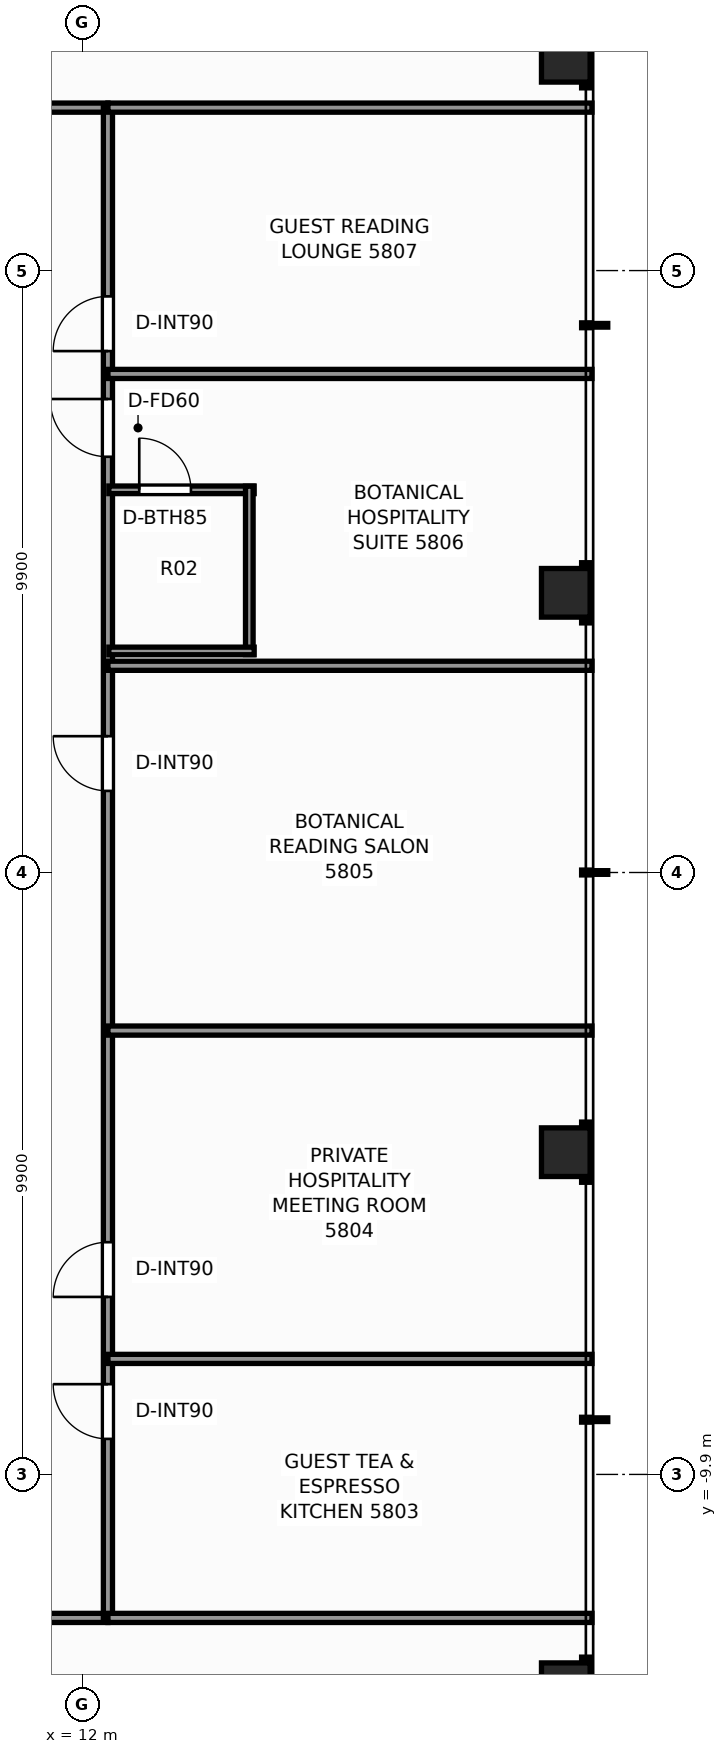
"""IFC4 building model, lengths in metres.
Left out: names, types, materials, properties, quantities, classifications, styles, units other than length and angle.
Written with IfcOpenShell. Run it as: python <this file> out.ifc"""

import sys

from ifc_helpers import new_model, si_unit, direction, frame, frame_2d, origin, origin_2d, place, context, subcontext, project, spatial, rectangle, extrude, element, fill, save


model = new_model("IFC4")
c1 = context("Model", 3, precision=1e-05, world=origin(), true_north=direction((0.0, 1.0)))
c2 = subcontext(c1, "Body", "Model", "MODEL_VIEW")
j1 = project(units=[si_unit("LENGTHUNIT", "METRE"), si_unit("PLANEANGLEUNIT", "RADIAN")], contexts=[c1])
p1 = place(None, origin())
s1 = spatial("IfcSite", under=j1, at=p1, CompositionType="ELEMENT")
p2 = place(p1, origin())
s2 = spatial("IfcBuilding", under=s1, at=p2, CompositionType="ELEMENT")
p3 = place(p2, frame((0.0, 0.0, 199.8)))
s3 = spatial("IfcBuildingStorey", under=s2, at=p3, CompositionType="ELEMENT", Elevation=199.8)
for number, where, z_axis, x_axis in (
    (1, (19.95, -13.4, 0.0), (0.0, 0.0, 1.0), (1.0, 0.0, 0.0)),
    (2, (19.95, -4.6, 0.0), (0.0, 0.0, 1.0), (1.0, 0.0, 0.0)),
    (3, (19.95, 4.6, 0.0), (0.0, 0.0, 1.0), (1.0, 0.0, 0.0)),
    (4, (19.95, 13.4, 0.0), (0.0, 0.0, 1.0), (1.0, 0.0, 0.0)),
):
    element("IfcColumn", number, at=place(p3, frame(where, z_axis=z_axis, x_axis=x_axis)), inside=s3, PredefinedType="COLUMN", context=c2, shape_type="SweptSolid", body=[
        extrude(rectangle(XDim=0.8, YDim=0.8, at=origin_2d()), origin(), (0.0, 0.0, 1.0), 3.3),
    ])
p4 = place(p3, frame((-12.42, -12.26, 0.0), z_axis=(0.0, 0.0, 1.0), x_axis=(1.0, 0.0, 0.0)))
e5 = element("IfcWall", 5, at=p4, inside=s3, PredefinedType="PARTITIONING", context=c2, shape_type="SweptSolid", body=[
    extrude(rectangle(XDim=24.84, YDim=0.15, at=frame_2d((12.42, 0.0))), origin(), (0.0, 0.0, 1.0), 2.369),
])
p5 = place(p4, frame((4.435, 0.0, 0.0)))
e6 = element("IfcOpeningElement", 6, at=p5, cuts=e5, PredefinedType="OPENING", context=c2, shape_type="SweptSolid", body=[
    extrude(rectangle(XDim=0.9, YDim=2.06, at=frame_2d((0.45, 1.03))), frame((0.0, 0.085, 0.0), z_axis=(0.0, -1.0, 0.0), x_axis=(1.0, 0.0, 0.0)), (0.0, 0.0, 1.0), 0.17),
])
p6 = place(p4, frame((19.505, 0.0, 0.0)))
e7 = element("IfcOpeningElement", 7, at=p6, cuts=e5, PredefinedType="OPENING", context=c2, shape_type="SweptSolid", body=[
    extrude(rectangle(XDim=0.9, YDim=2.06, at=frame_2d((0.45, 1.03))), frame((0.0, 0.085, 0.0), z_axis=(0.0, -1.0, 0.0), x_axis=(1.0, 0.0, 0.0)), (0.0, 0.0, 1.0), 0.17),
])
p7 = place(p3, frame((-12.42, 12.58, 0.0), z_axis=(0.0, 0.0, 1.0), x_axis=(1.0, 0.0, 0.0)))
e8 = element("IfcWall", 8, at=p7, inside=s3, PredefinedType="PARTITIONING", context=c2, shape_type="SweptSolid", body=[
    extrude(rectangle(XDim=24.84, YDim=0.15, at=frame_2d((12.42, 0.0))), origin(), (0.0, 0.0, 1.0), 2.369),
])
p8 = place(p7, frame((4.435, 0.0, 0.0)))
e9 = element("IfcOpeningElement", 9, at=p8, cuts=e8, PredefinedType="OPENING", context=c2, shape_type="SweptSolid", body=[
    extrude(rectangle(XDim=0.9, YDim=2.06, at=frame_2d((0.45, 1.03))), frame((0.0, 0.085, 0.0), z_axis=(0.0, -1.0, 0.0), x_axis=(1.0, 0.0, 0.0)), (0.0, 0.0, 1.0), 0.17),
])
p9 = place(p7, frame((19.505, 0.0, 0.0)))
e10 = element("IfcOpeningElement", 10, at=p9, cuts=e8, PredefinedType="OPENING", context=c2, shape_type="SweptSolid", body=[
    extrude(rectangle(XDim=0.9, YDim=2.06, at=frame_2d((0.45, 1.03))), frame((0.0, 0.085, 0.0), z_axis=(0.0, -1.0, 0.0), x_axis=(1.0, 0.0, 0.0)), (0.0, 0.0, 1.0), 0.17),
])
p10 = place(p3, frame((12.42, -12.26, 0.0), z_axis=(0.0, 0.0, 1.0), x_axis=(0.0, 1.0, 0.0)))
e11 = element("IfcWall", 11, at=p10, inside=s3, PredefinedType="PARTITIONING", context=c2, shape_type="SweptSolid", body=[
    extrude(rectangle(XDim=24.84, YDim=0.15, at=frame_2d((12.42, 0.0))), origin(), (0.0, 0.0, 1.0), 2.369),
])
p11 = place(p10, frame((2.944, 0.0, 0.0)))
e12 = element("IfcOpeningElement", 12, at=p11, cuts=e11, PredefinedType="OPENING", context=c2, shape_type="SweptSolid", body=[
    extrude(rectangle(XDim=0.9, YDim=2.06, at=frame_2d((0.45, 1.03))), frame((0.0, 0.085, 0.0), z_axis=(0.0, -1.0, 0.0), x_axis=(1.0, 0.0, 0.0)), (0.0, 0.0, 1.0), 0.17),
])
p12 = place(p10, frame((5.279, 0.0, 0.0)))
e13 = element("IfcOpeningElement", 13, at=p12, cuts=e11, PredefinedType="OPENING", context=c2, shape_type="SweptSolid", body=[
    extrude(rectangle(XDim=0.9, YDim=2.06, at=frame_2d((0.45, 1.03))), frame((0.0, 0.085, 0.0), z_axis=(0.0, -1.0, 0.0), x_axis=(1.0, 0.0, 0.0)), (0.0, 0.0, 1.0), 0.17),
])
p13 = place(p10, frame((13.602, 0.0, 0.0)))
e14 = element("IfcOpeningElement", 14, at=p13, cuts=e11, PredefinedType="OPENING", context=c2, shape_type="SweptSolid", body=[
    extrude(rectangle(XDim=0.9, YDim=2.06, at=frame_2d((0.45, 1.03))), frame((0.0, 0.085, 0.0), z_axis=(0.0, -1.0, 0.0), x_axis=(1.0, 0.0, 0.0)), (0.0, 0.0, 1.0), 0.17),
])
p14 = place(p10, frame((19.098, 0.0, 0.0)))
e15 = element("IfcOpeningElement", 15, at=p14, cuts=e11, PredefinedType="OPENING", context=c2, shape_type="SweptSolid", body=[
    extrude(rectangle(XDim=0.95, YDim=2.06, at=frame_2d((0.475, 1.03))), frame((0.0, 0.085, 0.0), z_axis=(0.0, -1.0, 0.0), x_axis=(1.0, 0.0, 0.0)), (0.0, 0.0, 1.0), 0.17),
])
p15 = place(p10, frame((20.836, 0.0, 0.0)))
e16 = element("IfcOpeningElement", 16, at=p15, cuts=e11, PredefinedType="OPENING", context=c2, shape_type="SweptSolid", body=[
    extrude(rectangle(XDim=0.9, YDim=2.06, at=frame_2d((0.45, 1.03))), frame((0.0, 0.085, 0.0), z_axis=(0.0, -1.0, 0.0), x_axis=(1.0, 0.0, 0.0)), (0.0, 0.0, 1.0), 0.17),
])
for number, where, z_axis, x_axis in (
    (17, (12.42, -12.26, 0.0), (0.0, 0.0, 1.0), (1.0, 0.0, 0.0)),
    (18, (12.42, 12.58, 0.0), (0.0, 0.0, 1.0), (1.0, 0.0, 0.0)),
):
    element("IfcWall", number, at=place(p3, frame(where, z_axis=z_axis, x_axis=x_axis)), inside=s3, PredefinedType="PARTITIONING", context=c2, shape_type="SweptSolid", body=[
        extrude(rectangle(XDim=7.96, YDim=0.15, at=frame_2d((3.98, 0.0))), origin(), (0.0, 0.0, 1.0), 2.369),
    ])
for number, where, z_axis, x_axis in (
    (19, (12.42, -8.0, 0.0), (0.0, 0.0, 1.0), (1.0, 0.0, 0.0)),
    (20, (12.42, -2.6, 0.0), (0.0, 0.0, 1.0), (1.0, 0.0, 0.0)),
    (21, (12.42, 3.4, 0.0), (0.0, 0.0, 1.0), (1.0, 0.0, 0.0)),
    (22, (12.42, 8.2, 0.0), (0.0, 0.0, 1.0), (1.0, 0.0, 0.0)),
):
    element("IfcWall", number, at=place(p3, frame(where, z_axis=z_axis, x_axis=x_axis)), inside=s3, PredefinedType="PARTITIONING", context=c2, shape_type="SweptSolid", body=[
        extrude(rectangle(XDim=7.96, YDim=0.15, at=frame_2d((3.98, 0.0))), origin(), (0.0, 0.0, 1.0), 2.453),
    ])
p16 = place(p3, frame((12.435, 6.294, 0.0), z_axis=(0.0, 0.0, 1.0), x_axis=(1.0, 0.0, 0.0)))
e23 = element("IfcWall", 23, at=p16, inside=s3, PredefinedType="PARTITIONING", context=c2, shape_type="SweptSolid", body=[
    extrude(rectangle(XDim=2.39, YDim=0.125, at=frame_2d((1.195, 0.0))), origin(), (0.0, 0.0, 1.0), 3.08),
])
p17 = place(p16, frame((0.5, 0.0, 0.0)))
e24 = element("IfcOpeningElement", 24, at=p17, cuts=e23, PredefinedType="OPENING", context=c2, shape_type="SweptSolid", body=[
    extrude(rectangle(XDim=0.85, YDim=2.03, at=frame_2d((0.425, 1.015))), frame((0.0, 0.073, 0.0), z_axis=(0.0, -1.0, 0.0), x_axis=(1.0, 0.0, 0.0)), (0.0, 0.0, 1.0), 0.145),
])
p18 = place(p3, frame((14.745, 3.584, 0.0), z_axis=(0.0, 0.0, 1.0), x_axis=(0.0, 1.0, 0.0)))
e25 = element("IfcWall", 25, at=p18, inside=s3, PredefinedType="PARTITIONING", context=c2, shape_type="SweptSolid", body=[
    extrude(rectangle(XDim=2.77, YDim=0.125, at=frame_2d((1.385, 0.0))), origin(), (0.0, 0.0, 1.0), 2.369),
])
p19 = place(p3, frame((12.435, 3.644, 0.0), z_axis=(0.0, 0.0, 1.0), x_axis=(1.0, 0.0, 0.0)))
e26 = element("IfcWall", 26, at=p19, inside=s3, PredefinedType="PARTITIONING", context=c2, shape_type="SweptSolid", body=[
    extrude(rectangle(XDim=2.39, YDim=0.125, at=frame_2d((1.195, 0.0))), origin(), (0.0, 0.0, 1.0), 3.08),
])
p20 = place(p11, origin())
e27 = element("IfcDoor", 27, at=p20, inside=s3, OperationType="SINGLE_SWING_RIGHT", PredefinedType="DOOR", context=c2, shape_type="SweptSolid", body=[
    extrude(rectangle(XDim=0.9, YDim=2.06, at=frame_2d((0.45, 1.03))), frame((0.0, 0.025, 0.0), z_axis=(0.0, -1.0, 0.0), x_axis=(1.0, 0.0, 0.0)), (0.0, 0.0, 1.0), 0.05),
])
fill(e12, e27)
p21 = place(p12, origin())
e28 = element("IfcDoor", 28, at=p21, inside=s3, OperationType="SINGLE_SWING_LEFT", PredefinedType="DOOR", context=c2, shape_type="SweptSolid", body=[
    extrude(rectangle(XDim=0.9, YDim=2.06, at=frame_2d((0.45, 1.03))), frame((0.0, 0.025, 0.0), z_axis=(0.0, -1.0, 0.0), x_axis=(1.0, 0.0, 0.0)), (0.0, 0.0, 1.0), 0.05),
])
fill(e13, e28)
p22 = place(p13, origin())
e29 = element("IfcDoor", 29, at=p22, inside=s3, OperationType="SINGLE_SWING_RIGHT", PredefinedType="DOOR", context=c2, shape_type="SweptSolid", body=[
    extrude(rectangle(XDim=0.9, YDim=2.06, at=frame_2d((0.45, 1.03))), frame((0.0, 0.025, 0.0), z_axis=(0.0, -1.0, 0.0), x_axis=(1.0, 0.0, 0.0)), (0.0, 0.0, 1.0), 0.05),
])
fill(e14, e29)
p23 = place(p17, origin())
e30 = element("IfcDoor", 30, at=p23, inside=s3, OperationType="SINGLE_SWING_LEFT", PredefinedType="DOOR", context=c2, shape_type="SweptSolid", body=[
    extrude(rectangle(XDim=0.85, YDim=2.03, at=frame_2d((0.425, 1.015))), frame((0.0, 0.025, 0.0), z_axis=(0.0, -1.0, 0.0), x_axis=(1.0, 0.0, 0.0)), (0.0, 0.0, 1.0), 0.05),
])
fill(e24, e30)
p24 = place(p14, origin())
e31 = element("IfcDoor", 31, at=p24, inside=s3, OperationType="SINGLE_SWING_RIGHT", PredefinedType="DOOR", context=c2, shape_type="SweptSolid", body=[
    extrude(rectangle(XDim=0.95, YDim=2.06, at=frame_2d((0.475, 1.03))), frame((0.0, 0.025, 0.0), z_axis=(0.0, -1.0, 0.0), x_axis=(1.0, 0.0, 0.0)), (0.0, 0.0, 1.0), 0.05),
])
fill(e15, e31)
p25 = place(p15, origin())
e32 = element("IfcDoor", 32, at=p25, inside=s3, OperationType="SINGLE_SWING_LEFT", PredefinedType="DOOR", context=c2, shape_type="SweptSolid", body=[
    extrude(rectangle(XDim=0.9, YDim=2.06, at=frame_2d((0.45, 1.03))), frame((0.0, 0.025, 0.0), z_axis=(0.0, -1.0, 0.0), x_axis=(1.0, 0.0, 0.0)), (0.0, 0.0, 1.0), 0.05),
])
fill(e16, e32)
save(model, sys.argv[1])
